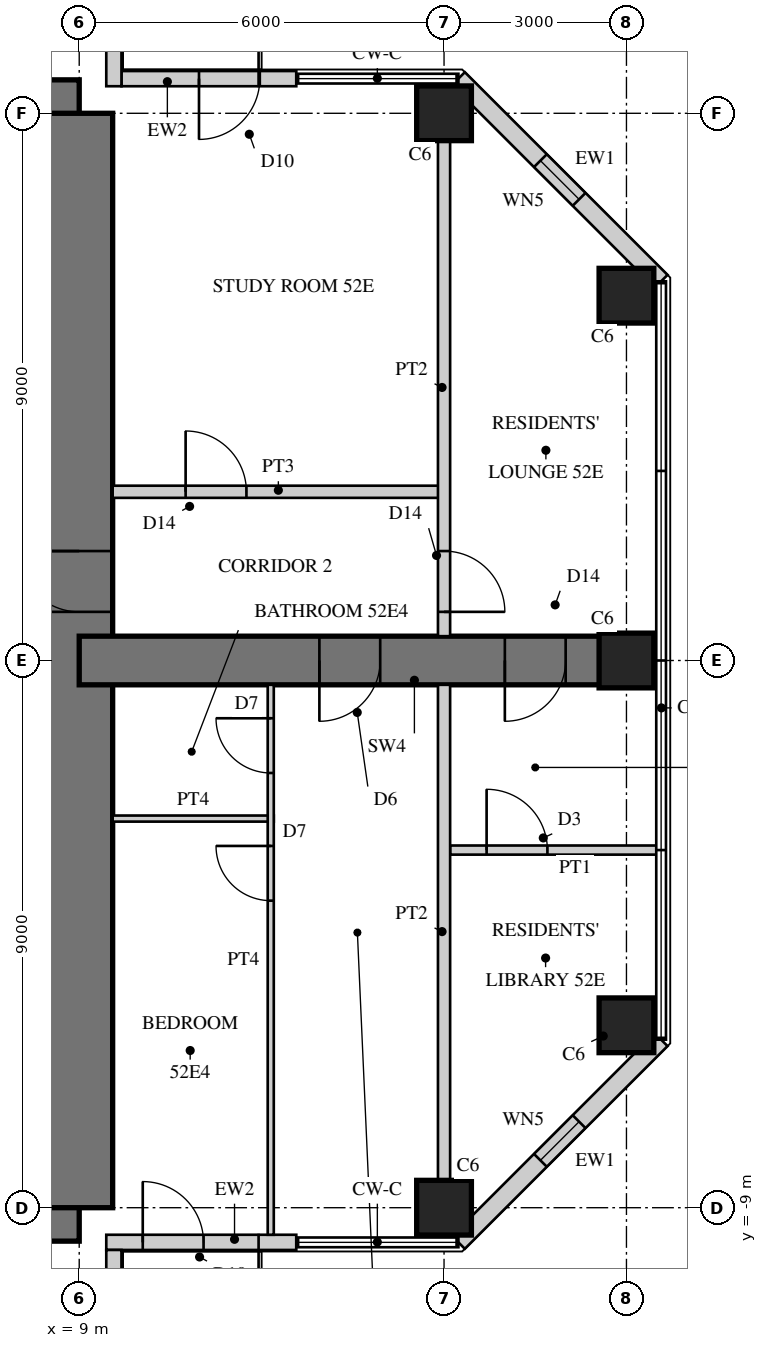
"""IFC4 building model, lengths in metres.
Left out: names, types, materials, properties, quantities, classifications, styles, units other than length and angle.
Written with IfcOpenShell. Run it as: python <this file> out.ifc"""

import sys

from ifc_helpers import new_model, si_unit, direction, frame, frame_2d, origin, origin_2d, place, context, subcontext, project, spatial, rectangle, hollow_rectangle, extrude, element, fill, save


model = new_model("IFC4")
c1 = context("Model", 3, precision=1e-05, world=origin(), true_north=direction((0.0, 1.0)))
c2 = subcontext(c1, "Body", "Model", "MODEL_VIEW")
j1 = project(units=[si_unit("LENGTHUNIT", "METRE"), si_unit("PLANEANGLEUNIT", "RADIAN")], contexts=[c1])
p1 = place(None, origin())
s1 = spatial("IfcSite", under=j1, at=p1, CompositionType="ELEMENT")
p2 = place(p1, origin())
s2 = spatial("IfcBuilding", under=s1, at=p2, CompositionType="ELEMENT")
p3 = place(p2, frame((0.0, 0.0, 206.9)))
s3 = spatial("IfcBuildingStorey", under=s2, at=p3, CompositionType="ELEMENT", Elevation=206.9)
p4 = place(p3, frame((9.0, 9.0, 0.0), z_axis=(0.0, 0.0, 1.0), x_axis=(-1.0, 0.0, 0.0)))
e1 = element("IfcWall", 1, at=p4, inside=s3, PredefinedType="SHEAR", context=c2, shape_type="SweptSolid", body=[
    extrude(rectangle(XDim=18.0, YDim=1.1, at=frame_2d((9.0, 0.0))), origin(), (0.0, 0.0, 1.0), 3.4),
])
p5 = place(p4, frame((9.8, 0.0, 0.0)))
e2 = element("IfcOpeningElement", 2, at=p5, cuts=e1, PredefinedType="OPENING", context=c2, shape_type="SweptSolid", body=[
    extrude(rectangle(XDim=1.0, YDim=2.4, at=frame_2d((0.5, 1.2))), frame((0.0, 0.56, 0.0), z_axis=(0.0, -1.0, 0.0), x_axis=(1.0, 0.0, 0.0)), (0.0, 0.0, 1.0), 1.12),
])
p6 = place(p3, frame((-9.0, -9.0, 0.0), z_axis=(0.0, 0.0, 1.0), x_axis=(1.0, 0.0, 0.0)))
e3 = element("IfcWall", 3, at=p6, inside=s3, PredefinedType="SHEAR", context=c2, shape_type="SweptSolid", body=[
    extrude(rectangle(XDim=18.0, YDim=1.1, at=frame_2d((9.0, 0.0))), origin(), (0.0, 0.0, 1.0), 3.4),
])
p7 = place(p6, frame((9.8, 0.0, 0.0)))
e4 = element("IfcOpeningElement", 4, at=p7, cuts=e3, PredefinedType="OPENING", context=c2, shape_type="SweptSolid", body=[
    extrude(rectangle(XDim=1.0, YDim=2.4, at=frame_2d((0.5, 1.2))), frame((0.0, 0.56, 0.0), z_axis=(0.0, -1.0, 0.0), x_axis=(1.0, 0.0, 0.0)), (0.0, 0.0, 1.0), 1.12),
])
p8 = place(p3, frame((9.0, -9.0, 0.0), z_axis=(0.0, 0.0, 1.0), x_axis=(0.0, 1.0, 0.0)))
e5 = element("IfcWall", 5, at=p8, inside=s3, PredefinedType="SHEAR", context=c2, shape_type="SweptSolid", body=[
    extrude(rectangle(XDim=18.0, YDim=1.1, at=frame_2d((9.0, 0.0))), origin(), (0.0, 0.0, 1.0), 3.4),
])
p9 = place(p8, frame((9.8, 0.0, 0.0)))
e6 = element("IfcOpeningElement", 6, at=p9, cuts=e5, PredefinedType="OPENING", context=c2, shape_type="SweptSolid", body=[
    extrude(rectangle(XDim=1.0, YDim=2.4, at=frame_2d((0.5, 1.2))), frame((0.0, 0.56, 0.0), z_axis=(0.0, -1.0, 0.0), x_axis=(1.0, 0.0, 0.0)), (0.0, 0.0, 1.0), 1.12),
])
p10 = place(p3, frame((9.0, 0.0, 0.0), z_axis=(0.0, 0.0, 1.0), x_axis=(1.0, 0.0, 0.0)))
e7 = element("IfcWall", 7, at=p10, inside=s3, PredefinedType="SHEAR", context=c2, shape_type="SweptSolid", body=[
    extrude(rectangle(XDim=9.0, YDim=0.8, at=frame_2d((4.5, 0.0))), origin(), (0.0, 0.0, 1.0), 3.4),
])
p11 = place(p10, frame((3.95, 0.0, 0.0)))
e8 = element("IfcOpeningElement", 8, at=p11, cuts=e7, PredefinedType="OPENING", context=c2, shape_type="SweptSolid", body=[
    extrude(rectangle(XDim=1.0, YDim=2.15, at=frame_2d((0.5, 1.075))), frame((0.0, 0.41, 0.0), z_axis=(0.0, -1.0, 0.0), x_axis=(1.0, 0.0, 0.0)), (0.0, 0.0, 1.0), 0.82),
])
p12 = place(p10, frame((7.0, 0.0, 0.0)))
e9 = element("IfcOpeningElement", 9, at=p12, cuts=e7, PredefinedType="OPENING", context=c2, shape_type="SweptSolid", body=[
    extrude(rectangle(XDim=1.0, YDim=2.2, at=frame_2d((0.5, 1.1))), frame((0.0, 0.41, 0.0), z_axis=(0.0, -1.0, 0.0), x_axis=(1.0, 0.0, 0.0)), (0.0, 0.0, 1.0), 0.82),
])
for number, where, z_axis, x_axis in (
    (10, (15.0, -9.0, 0.0), (0.0, 0.0, 1.0), (1.0, 0.0, 0.0)),
    (11, (15.0, 9.0, 0.0), (0.0, 0.0, 1.0), (1.0, 0.0, 0.0)),
    (12, (18.0, -6.0, 0.0), (0.0, 0.0, 1.0), (1.0, 0.0, 0.0)),
    (13, (18.0, 0.0, 0.0), (0.0, 0.0, 1.0), (1.0, 0.0, 0.0)),
    (14, (18.0, 6.0, 0.0), (0.0, 0.0, 1.0), (1.0, 0.0, 0.0)),
):
    element("IfcColumn", number, at=place(p3, frame(where, z_axis=z_axis, x_axis=x_axis)), inside=s3, PredefinedType="COLUMN", context=c2, shape_type="SweptSolid", body=[
        extrude(rectangle(XDim=0.9, YDim=0.9, at=origin_2d()), origin(), (0.0, 0.0, 1.0), 3.4),
    ])
p13 = place(p3, frame((9.445, -9.57, 0.0), z_axis=(0.0, 0.0, 1.0), x_axis=(1.0, 0.0, 0.0)))
e15 = element("IfcWall", 15, at=p13, inside=s3, PredefinedType="SOLIDWALL", context=c2, shape_type="SweptSolid", body=[
    extrude(rectangle(XDim=3.125, YDim=0.25, at=frame_2d((1.562, 0.0))), origin(), (0.0, 0.0, 1.0), 3.22),
])
p14 = place(p13, frame((0.6, 0.0, 0.0)))
e16 = element("IfcOpeningElement", 16, at=p14, cuts=e15, PredefinedType="OPENING", context=c2, shape_type="SweptSolid", body=[
    extrude(rectangle(XDim=1.0, YDim=2.2, at=frame_2d((0.5, 1.1))), frame((0.0, 0.135, 0.0), z_axis=(0.0, -1.0, 0.0), x_axis=(1.0, 0.0, 0.0)), (0.0, 0.0, 1.0), 0.27),
])
p15 = place(p3, frame((15.236, -9.57, 0.0), z_axis=(0.0, 0.0, 1.0), x_axis=(0.707106781187, 0.707106781187, 0.0)))
e17 = element("IfcWall", 17, at=p15, inside=s3, PredefinedType="SOLIDWALL", context=c2, shape_type="SweptSolid", body=[
    extrude(rectangle(XDim=4.715, YDim=0.3, at=frame_2d((2.357, 0.0))), origin(), (0.0, 0.0, 1.0), 3.22),
])
p16 = place(p15, frame((1.907, 0.0, 0.3)))
e18 = element("IfcOpeningElement", 18, at=p16, cuts=e17, PredefinedType="OPENING", context=c2, shape_type="SweptSolid", body=[
    extrude(rectangle(XDim=0.9, YDim=2.4, at=frame_2d((0.45, 1.2))), frame((0.0, 0.16, 0.0), z_axis=(0.0, -1.0, 0.0), x_axis=(1.0, 0.0, 0.0)), (0.0, 0.0, 1.0), 0.32),
])
p17 = place(p3, frame((18.57, 6.236, 0.0), z_axis=(0.0, 0.0, 1.0), x_axis=(-0.707106781187, 0.707106781187, 0.0)))
e19 = element("IfcWall", 19, at=p17, inside=s3, PredefinedType="SOLIDWALL", context=c2, shape_type="SweptSolid", body=[
    extrude(rectangle(XDim=4.715, YDim=0.3, at=frame_2d((2.357, 0.0))), origin(), (0.0, 0.0, 1.0), 3.22),
])
p18 = place(p17, frame((1.907, 0.0, 0.3)))
e20 = element("IfcOpeningElement", 20, at=p18, cuts=e19, PredefinedType="OPENING", context=c2, shape_type="SweptSolid", body=[
    extrude(rectangle(XDim=0.9, YDim=2.4, at=frame_2d((0.45, 1.2))), frame((0.0, 0.16, 0.0), z_axis=(0.0, -1.0, 0.0), x_axis=(1.0, 0.0, 0.0)), (0.0, 0.0, 1.0), 0.32),
])
p19 = place(p3, frame((12.57, 9.57, 0.0), z_axis=(0.0, 0.0, 1.0), x_axis=(-1.0, 0.0, 0.0)))
e21 = element("IfcWall", 21, at=p19, inside=s3, PredefinedType="SOLIDWALL", context=c2, shape_type="SweptSolid", body=[
    extrude(rectangle(XDim=2.875, YDim=0.25, at=frame_2d((1.438, 0.0))), origin(), (0.0, 0.0, 1.0), 3.22),
])
p20 = place(p19, frame((0.6, 0.0, 0.0)))
e22 = element("IfcOpeningElement", 22, at=p20, cuts=e21, PredefinedType="OPENING", context=c2, shape_type="SweptSolid", body=[
    extrude(rectangle(XDim=1.0, YDim=2.2, at=frame_2d((0.5, 1.1))), frame((0.0, 0.135, 0.0), z_axis=(0.0, -1.0, 0.0), x_axis=(1.0, 0.0, 0.0)), (0.0, 0.0, 1.0), 0.27),
])
p21 = place(p3, frame((9.57, 9.445, 0.0), z_axis=(0.0, 0.0, 1.0), x_axis=(0.0, 1.0, 0.0)))
e23 = element("IfcWall", 23, at=p21, inside=s3, PredefinedType="SOLIDWALL", context=c2, shape_type="SweptSolid", body=[
    extrude(rectangle(XDim=3.125, YDim=0.25, at=frame_2d((1.562, 0.0))), origin(), (0.0, 0.0, 1.0), 3.22),
])
p22 = place(p21, frame((0.6, 0.0, 0.0)))
e24 = element("IfcOpeningElement", 24, at=p22, cuts=e23, PredefinedType="OPENING", context=c2, shape_type="SweptSolid", body=[
    extrude(rectangle(XDim=1.0, YDim=2.2, at=frame_2d((0.5, 1.1))), frame((0.0, 0.135, 0.0), z_axis=(0.0, -1.0, 0.0), x_axis=(1.0, 0.0, 0.0)), (0.0, 0.0, 1.0), 0.27),
])
p23 = place(p3, frame((9.57, -12.57, 0.0), z_axis=(0.0, 0.0, 1.0), x_axis=(0.0, 1.0, 0.0)))
e25 = element("IfcWall", 25, at=p23, inside=s3, PredefinedType="SOLIDWALL", context=c2, shape_type="SweptSolid", body=[
    extrude(rectangle(XDim=2.875, YDim=0.25, at=frame_2d((1.438, 0.0))), origin(), (0.0, 0.0, 1.0), 3.22),
])
p24 = place(p23, frame((0.6, 0.0, 0.0)))
e26 = element("IfcOpeningElement", 26, at=p24, cuts=e25, PredefinedType="OPENING", context=c2, shape_type="SweptSolid", body=[
    extrude(rectangle(XDim=1.0, YDim=2.2, at=frame_2d((0.5, 1.1))), frame((0.0, 0.135, 0.0), z_axis=(0.0, -1.0, 0.0), x_axis=(1.0, 0.0, 0.0)), (0.0, 0.0, 1.0), 0.27),
])
p25 = place(p3, frame((9.55, -2.6, 0.0), z_axis=(0.0, 0.0, 1.0), x_axis=(1.0, 0.0, 0.0)))
e27 = element("IfcWall", 27, at=p25, inside=s3, PredefinedType="PARTITIONING", context=c2, shape_type="SweptSolid", body=[
    extrude(rectangle(XDim=2.65, YDim=0.1, at=frame_2d((1.325, 0.0))), origin(), (0.0, 0.0, 1.0), 3.22),
])
p26 = place(p3, frame((12.15, -9.445, 0.0), z_axis=(0.0, 0.0, 1.0), x_axis=(0.0, 1.0, 0.0)))
e28 = element("IfcWall", 28, at=p26, inside=s3, PredefinedType="PARTITIONING", context=c2, shape_type="SweptSolid", body=[
    extrude(rectangle(XDim=9.045, YDim=0.1, at=frame_2d((4.522, 0.0))), origin(), (0.0, 0.0, 1.0), 3.22),
])
p27 = place(p26, frame((5.495, 0.0, 0.0)))
e29 = element("IfcOpeningElement", 29, at=p27, cuts=e28, PredefinedType="OPENING", context=c2, shape_type="SweptSolid", body=[
    extrude(rectangle(XDim=0.9, YDim=2.1, at=frame_2d((0.45, 1.05))), frame((0.0, 0.06, 0.0), z_axis=(0.0, -1.0, 0.0), x_axis=(1.0, 0.0, 0.0)), (0.0, 0.0, 1.0), 0.12),
])
p28 = place(p26, frame((7.595, 0.0, 0.0)))
e30 = element("IfcOpeningElement", 30, at=p28, cuts=e28, PredefinedType="OPENING", context=c2, shape_type="SweptSolid", body=[
    extrude(rectangle(XDim=0.9, YDim=2.1, at=frame_2d((0.45, 1.05))), frame((0.0, 0.06, 0.0), z_axis=(0.0, -1.0, 0.0), x_axis=(1.0, 0.0, 0.0)), (0.0, 0.0, 1.0), 0.12),
])
p29 = place(p3, frame((9.55, 2.775, 0.0), z_axis=(0.0, 0.0, 1.0), x_axis=(1.0, 0.0, 0.0)))
e31 = element("IfcWall", 31, at=p29, inside=s3, PredefinedType="SOLIDWALL", context=c2, shape_type="SweptSolid", body=[
    extrude(rectangle(XDim=5.45, YDim=0.2, at=frame_2d((2.725, 0.0))), origin(), (0.0, 0.0, 1.0), 3.22),
])
p30 = place(p29, frame((1.2, 0.0, 0.0)))
e32 = element("IfcOpeningElement", 32, at=p30, cuts=e31, PredefinedType="OPENING", context=c2, shape_type="SweptSolid", body=[
    extrude(rectangle(XDim=1.0, YDim=2.2, at=frame_2d((0.5, 1.1))), frame((0.0, 0.11, 0.0), z_axis=(0.0, -1.0, 0.0), x_axis=(1.0, 0.0, 0.0)), (0.0, 0.0, 1.0), 0.22),
])
p31 = place(p3, frame((15.1, -3.118, 0.0), z_axis=(0.0, 0.0, 1.0), x_axis=(1.0, 0.0, 0.0)))
e33 = element("IfcWall", 33, at=p31, inside=s3, PredefinedType="PARTITIONING", context=c2, shape_type="SweptSolid", body=[
    extrude(rectangle(XDim=3.43, YDim=0.15, at=frame_2d((1.715, 0.0))), origin(), (0.0, 0.0, 1.0), 3.22),
])
p32 = place(p31, frame((0.6, 0.0, 0.0)))
e34 = element("IfcOpeningElement", 34, at=p32, cuts=e33, PredefinedType="OPENING", context=c2, shape_type="SweptSolid", body=[
    extrude(rectangle(XDim=1.0, YDim=2.1, at=frame_2d((0.5, 1.05))), frame((0.0, 0.085, 0.0), z_axis=(0.0, -1.0, 0.0), x_axis=(1.0, 0.0, 0.0)), (0.0, 0.0, 1.0), 0.17),
])
p33 = place(p3, frame((15.0, -8.55, 0.0), z_axis=(0.0, 0.0, 1.0), x_axis=(0.0, 1.0, 0.0)))
e35 = element("IfcWall", 35, at=p33, inside=s3, PredefinedType="SOLIDWALL", context=c2, shape_type="SweptSolid", body=[
    extrude(rectangle(XDim=8.15, YDim=0.2, at=frame_2d((4.075, 0.0))), origin(), (0.0, 0.0, 1.0), 2.47),
])
p34 = place(p3, frame((15.0, 0.4, 0.0), z_axis=(0.0, 0.0, 1.0), x_axis=(0.0, 1.0, 0.0)))
e36 = element("IfcWall", 36, at=p34, inside=s3, PredefinedType="SOLIDWALL", context=c2, shape_type="SweptSolid", body=[
    extrude(rectangle(XDim=8.15, YDim=0.2, at=frame_2d((4.075, 0.0))), origin(), (0.0, 0.0, 1.0), 2.47),
])
p35 = place(p34, frame((0.4, 0.0, 0.0)))
e37 = element("IfcOpeningElement", 37, at=p35, cuts=e36, PredefinedType="OPENING", context=c2, shape_type="SweptSolid", body=[
    extrude(rectangle(XDim=1.0, YDim=2.2, at=frame_2d((0.5, 1.1))), frame((0.0, 0.11, 0.0), z_axis=(0.0, -1.0, 0.0), x_axis=(1.0, 0.0, 0.0)), (0.0, 0.0, 1.0), 0.22),
])
p36 = place(p14, origin())
e38 = element("IfcDoor", 38, at=p36, inside=s3, OperationType="SINGLE_SWING_LEFT", PredefinedType="DOOR", context=c2, shape_type="SweptSolid", body=[
    extrude(hollow_rectangle(XDim=1.0, YDim=2.2, WallThickness=0.06, at=frame_2d((0.5, 1.1))), frame((0.0, 0.025, 0.0), z_axis=(0.0, -1.0, 0.0), x_axis=(1.0, 0.0, 0.0)), (0.0, 0.0, 1.0), 0.05),
    extrude(rectangle(XDim=0.879, YDim=2.079, at=frame_2d((0.5, 1.1))), frame((0.0, 0.025, 0.0), z_axis=(0.0, -1.0, 0.0), x_axis=(1.0, 0.0, 0.0)), (0.0, 0.0, 1.0), 0.05),
])
fill(e16, e38)
p37 = place(p16, origin())
e39 = element("IfcWindow", 39, at=p37, inside=s3, PartitioningType="SINGLE_PANEL", PredefinedType="WINDOW", context=c2, shape_type="SweptSolid", body=[
    extrude(hollow_rectangle(XDim=0.9, YDim=2.4, WallThickness=0.06, at=frame_2d((0.45, 1.2))), frame((0.0, 0.03, 0.0), z_axis=(0.0, -1.0, 0.0), x_axis=(1.0, 0.0, 0.0)), (0.0, 0.0, 1.0), 0.06),
    extrude(rectangle(XDim=0.779, YDim=2.279, at=frame_2d((0.45, 1.2))), frame((0.0, 0.03, 0.0), z_axis=(0.0, -1.0, 0.0), x_axis=(1.0, 0.0, 0.0)), (0.0, 0.0, 1.0), 0.06),
])
fill(e18, e39)
p38 = place(p18, origin())
e40 = element("IfcWindow", 40, at=p38, inside=s3, PartitioningType="SINGLE_PANEL", PredefinedType="WINDOW", context=c2, shape_type="SweptSolid", body=[
    extrude(hollow_rectangle(XDim=0.9, YDim=2.4, WallThickness=0.06, at=frame_2d((0.45, 1.2))), frame((0.0, 0.03, 0.0), z_axis=(0.0, -1.0, 0.0), x_axis=(1.0, 0.0, 0.0)), (0.0, 0.0, 1.0), 0.06),
    extrude(rectangle(XDim=0.779, YDim=2.279, at=frame_2d((0.45, 1.2))), frame((0.0, 0.03, 0.0), z_axis=(0.0, -1.0, 0.0), x_axis=(1.0, 0.0, 0.0)), (0.0, 0.0, 1.0), 0.06),
])
fill(e20, e40)
p39 = place(p20, origin())
e41 = element("IfcDoor", 41, at=p39, inside=s3, OperationType="SINGLE_SWING_RIGHT", PredefinedType="DOOR", context=c2, shape_type="SweptSolid", body=[
    extrude(hollow_rectangle(XDim=1.0, YDim=2.2, WallThickness=0.06, at=frame_2d((0.5, 1.1))), frame((0.0, 0.025, 0.0), z_axis=(0.0, -1.0, 0.0), x_axis=(1.0, 0.0, 0.0)), (0.0, 0.0, 1.0), 0.05),
    extrude(rectangle(XDim=0.879, YDim=2.079, at=frame_2d((0.5, 1.1))), frame((0.0, 0.025, 0.0), z_axis=(0.0, -1.0, 0.0), x_axis=(1.0, 0.0, 0.0)), (0.0, 0.0, 1.0), 0.05),
])
fill(e22, e41)
p40 = place(p27, origin())
e42 = element("IfcDoor", 42, at=p40, inside=s3, OperationType="SINGLE_SWING_RIGHT", PredefinedType="DOOR", context=c2, shape_type="SweptSolid", body=[
    extrude(rectangle(XDim=0.9, YDim=2.1, at=frame_2d((0.45, 1.05))), frame((0.0, 0.025, 0.0), z_axis=(0.0, -1.0, 0.0), x_axis=(1.0, 0.0, 0.0)), (0.0, 0.0, 1.0), 0.05),
])
fill(e29, e42)
p41 = place(p28, origin())
e43 = element("IfcDoor", 43, at=p41, inside=s3, OperationType="SINGLE_SWING_RIGHT", PredefinedType="DOOR", context=c2, shape_type="SweptSolid", body=[
    extrude(rectangle(XDim=0.9, YDim=2.1, at=frame_2d((0.45, 1.05))), frame((0.0, 0.025, 0.0), z_axis=(0.0, -1.0, 0.0), x_axis=(1.0, 0.0, 0.0)), (0.0, 0.0, 1.0), 0.05),
])
fill(e30, e43)
p42 = place(p30, origin())
e44 = element("IfcDoor", 44, at=p42, inside=s3, OperationType="SINGLE_SWING_LEFT", PredefinedType="DOOR", context=c2, shape_type="SweptSolid", body=[
    extrude(rectangle(XDim=1.0, YDim=2.2, at=frame_2d((0.5, 1.1))), frame((0.0, 0.025, 0.0), z_axis=(0.0, -1.0, 0.0), x_axis=(1.0, 0.0, 0.0)), (0.0, 0.0, 1.0), 0.05),
])
fill(e32, e44)
p43 = place(p32, origin())
e45 = element("IfcDoor", 45, at=p43, inside=s3, OperationType="SINGLE_SWING_LEFT", PredefinedType="DOOR", context=c2, shape_type="SweptSolid", body=[
    extrude(rectangle(XDim=1.0, YDim=2.1, at=frame_2d((0.5, 1.05))), frame((0.0, 0.025, 0.0), z_axis=(0.0, -1.0, 0.0), x_axis=(1.0, 0.0, 0.0)), (0.0, 0.0, 1.0), 0.05),
])
fill(e34, e45)
p44 = place(p35, frame((1.0, 0.0, 0.0), z_axis=(0.0, 0.0, 1.0), x_axis=(-1.0, 0.0, 0.0)))
e46 = element("IfcDoor", 46, at=p44, inside=s3, OperationType="SINGLE_SWING_RIGHT", PredefinedType="DOOR", context=c2, shape_type="SweptSolid", body=[
    extrude(rectangle(XDim=1.0, YDim=2.2, at=frame_2d((0.5, 1.1))), frame((0.0, 0.025, 0.0), z_axis=(0.0, -1.0, 0.0), x_axis=(1.0, 0.0, 0.0)), (0.0, 0.0, 1.0), 0.05),
])
fill(e37, e46)
p45 = place(p11, frame((1.0, 0.0, 0.0), z_axis=(0.0, 0.0, 1.0), x_axis=(-1.0, 0.0, 0.0)))
e47 = element("IfcDoor", 47, at=p45, inside=s3, OperationType="SINGLE_SWING_RIGHT", PredefinedType="DOOR", context=c2, shape_type="SweptSolid", body=[
    extrude(rectangle(XDim=1.0, YDim=2.15, at=frame_2d((0.5, 1.075))), frame((0.0, 0.025, 0.0), z_axis=(0.0, -1.0, 0.0), x_axis=(1.0, 0.0, 0.0)), (0.0, 0.0, 1.0), 0.05),
])
fill(e8, e47)
p46 = place(p12, frame((1.0, 0.0, 0.0), z_axis=(0.0, 0.0, 1.0), x_axis=(-1.0, 0.0, 0.0)))
e48 = element("IfcDoor", 48, at=p46, inside=s3, OperationType="SINGLE_SWING_RIGHT", PredefinedType="DOOR", context=c2, shape_type="SweptSolid", body=[
    extrude(rectangle(XDim=1.0, YDim=2.2, at=frame_2d((0.5, 1.1))), frame((0.0, 0.025, 0.0), z_axis=(0.0, -1.0, 0.0), x_axis=(1.0, 0.0, 0.0)), (0.0, 0.0, 1.0), 0.05),
])
fill(e9, e48)
p47 = place(p9, origin())
e49 = element("IfcDoor", 49, at=p47, inside=s3, OperationType="SINGLE_SWING_RIGHT", PredefinedType="DOOR", context=c2, shape_type="SweptSolid", body=[
    extrude(rectangle(XDim=1.0, YDim=2.4, at=frame_2d((0.5, 1.2))), frame((0.0, 0.055, 0.0), z_axis=(0.0, -1.0, 0.0), x_axis=(1.0, 0.0, 0.0)), (0.0, 0.0, 1.0), 0.05),
])
fill(e6, e49)
save(model, sys.argv[1])
